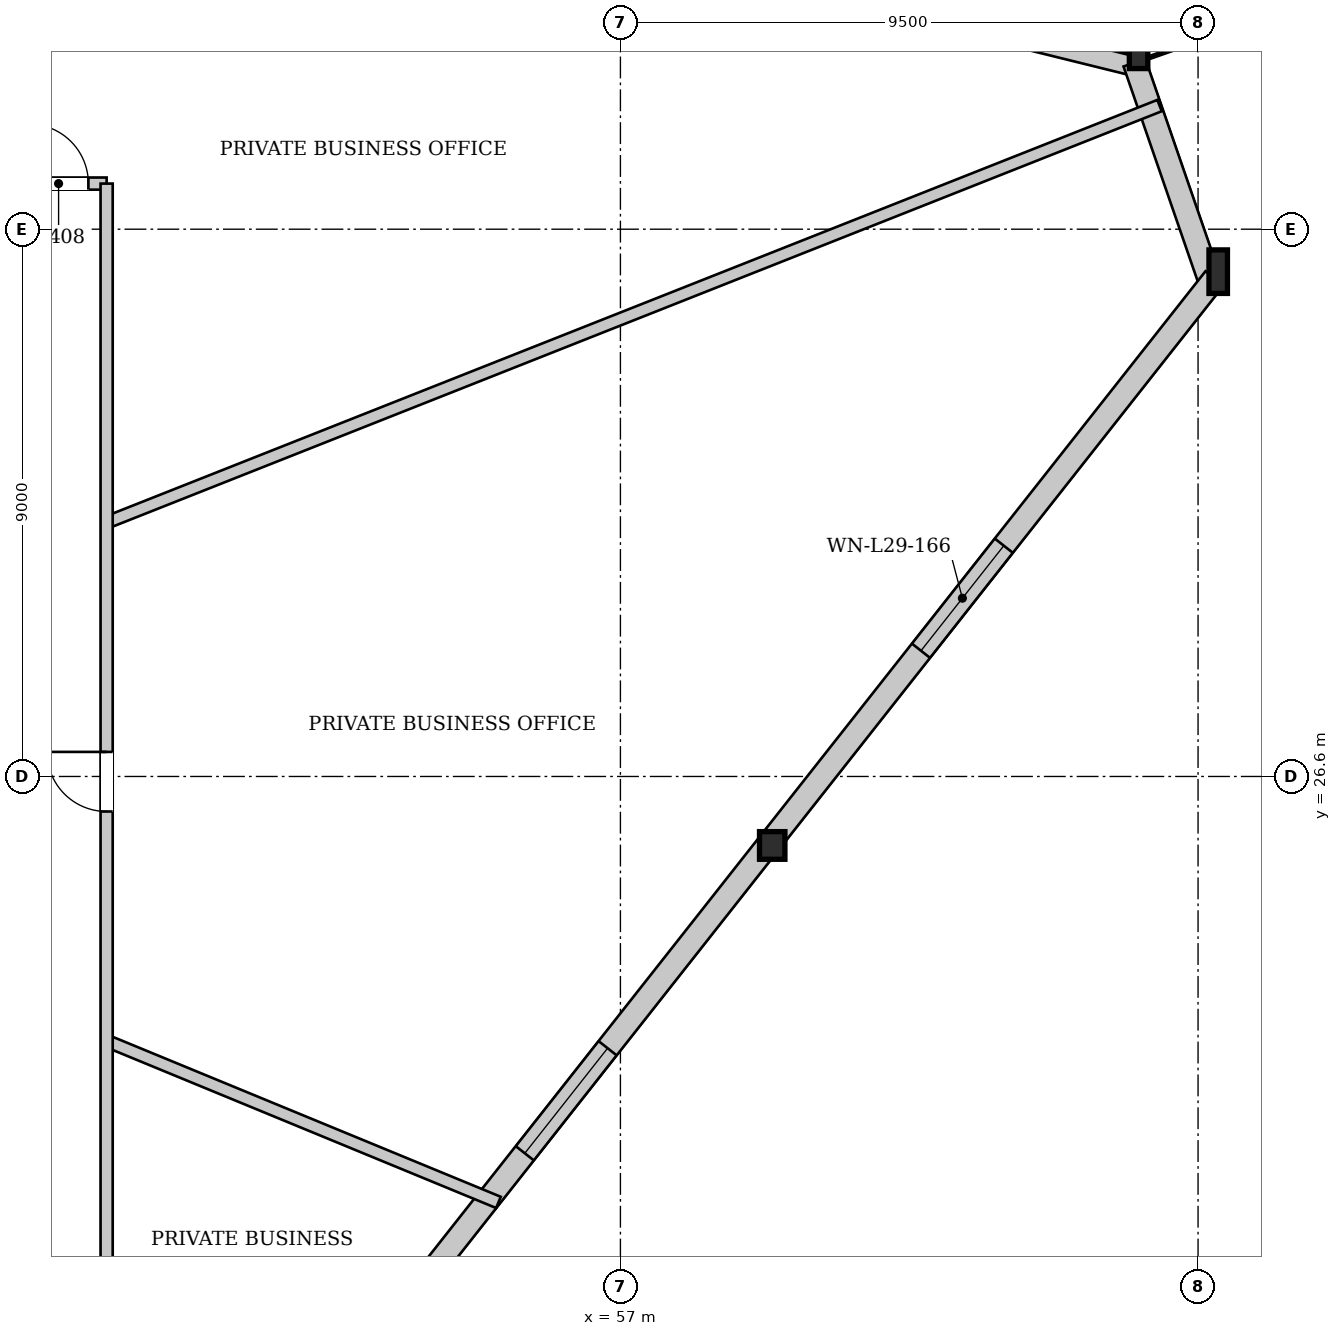
"""IFC4 building model, lengths in metres.
Left out: names, types, materials, properties, quantities, classifications, styles, units other than length and angle.
Written with IfcOpenShell. Run it as: python <this file> out.ifc"""

import sys

from ifc_helpers import new_model, si_unit, direction, frame, frame_2d, origin, origin_2d, place, context, subcontext, project, spatial, rectangle, i_section, extrude, source, transform, mapped, element, fill, save


model = new_model("IFC4")
c1 = context("Model", 3, precision=1e-05, world=origin(), true_north=direction((0.0, 1.0)))
c2 = subcontext(c1, "Body", "Model", "MODEL_VIEW")
j1 = project(units=[si_unit("LENGTHUNIT", "METRE"), si_unit("PLANEANGLEUNIT", "RADIAN")], contexts=[c1])
p1 = place(None, origin())
s1 = spatial("IfcSite", under=j1, at=p1, CompositionType="ELEMENT")
p2 = place(p1, origin())
s2 = spatial("IfcBuilding", under=s1, at=p2, CompositionType="ELEMENT")
p3 = place(p2, frame((0.0, 0.0, 112.8)))
s3 = spatial("IfcBuildingStorey", under=s2, at=p3, CompositionType="ELEMENT", Elevation=112.8)
m1 = source(origin(), c2, "Body", "SweptSolid", [
    extrude(i_section(OverallWidth=0.304, OverallDepth=0.716, WebThickness=0.021, FlangeThickness=0.04, at=origin_2d()), origin(), (0.0, 0.0, 1.0), 3.42),
])
p4 = place(p3, frame((66.92, 34.674, 0.0), z_axis=(-0.052108729922, 0.133269861321, 0.989708959406), x_axis=(-0.931338427179, -0.364154821553, 0.0)))
e1 = element("IfcColumn", 1, at=p4, inside=s3, PredefinedType="COLUMN", context=c2, shape_type="MappedRepresentation", body=[
    mapped(m1, transform((0.0, 0.0, 0.0), x_axis=(1.0, 0.0, 0.0), y_axis=(0.0, 1.0, 0.0), z_axis=(0.0, 0.0, 1.0), scale=1.0)),
])
m2 = source(origin(), c2, "Body", "SweptSolid", [
    extrude(i_section(OverallWidth=0.304, OverallDepth=0.716, WebThickness=0.021, FlangeThickness=0.04, at=origin_2d()), origin(), (0.0, 0.0, 1.0), 3.416),
])
p5 = place(p3, frame((65.634, 38.4, 0.0), z_axis=(-0.065470800854, 0.116789616371, 0.990996346988), x_axis=(-0.872287452748, -0.488993455763, 0.0)))
e2 = element("IfcColumn", 2, at=p5, inside=s3, PredefinedType="COLUMN", context=c2, shape_type="MappedRepresentation", body=[
    mapped(m2, transform((0.0, 0.0, 0.0), x_axis=(1.0, 0.0, 0.0), y_axis=(0.0, 1.0, 0.0), z_axis=(0.0, 0.0, 1.0), scale=1.0)),
])
m3 = source(origin(), c2, "Body", "SweptSolid", [
    extrude(i_section(OverallWidth=0.418, OverallDepth=0.455, WebThickness=0.038, FlangeThickness=0.059, at=origin_2d()), origin(), (0.0, 0.0, 1.0), 3.405),
])
p6 = place(p3, frame((59.516, 25.282, 0.0), z_axis=(-0.011256550997, 0.107976852234, 0.994089678772), x_axis=(-0.994609898476, -0.1036877517, 0.0)))
e3 = element("IfcColumn", 3, at=p6, inside=s3, PredefinedType="COLUMN", context=c2, shape_type="MappedRepresentation", body=[
    mapped(m3, transform((0.0, 0.0, 0.0), x_axis=(1.0, 0.0, 0.0), y_axis=(0.0, 1.0, 0.0), z_axis=(0.0, 0.0, 1.0), scale=1.0)),
])
p7 = place(p3, frame((42.954, 43.838, 0.0), z_axis=(0.0, 0.0, 1.0), x_axis=(0.970815465414, -0.239827713396, 0.0)))
e4 = element("IfcWall", 4, at=p7, inside=s3, PredefinedType="SOLIDWALL", context=c2, shape_type="SweptSolid", body=[
    extrude(rectangle(XDim=23.322, YDim=0.32, at=frame_2d((11.661, 0.0))), origin(), (0.0, 0.0, 1.0), 2.692),
])
p8 = place(p7, frame((6.913, 0.0, 0.0)))
e5 = element("IfcOpeningElement", 5, at=p8, cuts=e4, PredefinedType="OPENING", context=c2, shape_type="SweptSolid", body=[
    extrude(rectangle(XDim=1.1, YDim=2.3, at=frame_2d((0.55, 1.15))), frame((0.0, 0.17, 0.0), z_axis=(0.0, -1.0, 0.0), x_axis=(1.0, 0.0, 0.0)), (0.0, 0.0, 1.0), 0.34),
])
p9 = place(p7, frame((16.358, 0.0, 0.372)))
e6 = element("IfcOpeningElement", 6, at=p9, cuts=e4, PredefinedType="OPENING", context=c2, shape_type="SweptSolid", body=[
    extrude(rectangle(XDim=1.8, YDim=2.2, at=frame_2d((0.9, 1.1))), frame((0.0, 0.17, 0.0), z_axis=(0.0, -1.0, 0.0), x_axis=(1.0, 0.0, 0.0)), (0.0, 0.0, 1.0), 0.34),
])
p10 = place(p3, frame((65.454, 38.338, 0.0), z_axis=(0.0, 0.0, 1.0), x_axis=(0.32644681429, -0.945215571941, 0.0)))
e7 = element("IfcWall", 7, at=p10, inside=s3, PredefinedType="SOLIDWALL", context=c2, shape_type="SweptSolid", body=[
    extrude(rectangle(XDim=3.942, YDim=0.38, at=frame_2d((1.971, 0.0))), origin(), (0.0, 0.0, 1.0), 2.692),
])
p11 = place(p3, frame((66.771, 34.791, 0.0), z_axis=(0.0, 0.0, 1.0), x_axis=(-0.619144125254, -0.785277372757, 0.0)))
e8 = element("IfcWall", 8, at=p11, inside=s3, PredefinedType="SOLIDWALL", context=c2, shape_type="SweptSolid", body=[
    extrude(rectangle(XDim=23.92, YDim=0.38, at=frame_2d((11.96, 0.0))), origin(), (0.0, 0.0, 1.0), 2.692),
])
p12 = place(p11, frame((5.598, 0.0, 0.322)))
e9 = element("IfcOpeningElement", 9, at=p12, cuts=e8, PredefinedType="OPENING", context=c2, shape_type="SweptSolid", body=[
    extrude(rectangle(XDim=2.2, YDim=2.25, at=frame_2d((1.1, 1.125))), frame((0.0, 0.2, 0.0), z_axis=(0.0, -1.0, 0.0), x_axis=(1.0, 0.0, 0.0)), (0.0, 0.0, 1.0), 0.4),
])
p13 = place(p11, frame((16.122, 0.0, 0.322)))
e10 = element("IfcOpeningElement", 10, at=p13, cuts=e8, PredefinedType="OPENING", context=c2, shape_type="SweptSolid", body=[
    extrude(rectangle(XDim=2.2, YDim=2.25, at=frame_2d((1.1, 1.125))), frame((0.0, 0.2, 0.0), z_axis=(0.0, -1.0, 0.0), x_axis=(1.0, 0.0, 0.0)), (0.0, 0.0, 1.0), 0.4),
])
p14 = place(p3, frame((48.55, 22.252, 0.0), z_axis=(0.0, 0.0, 1.0), x_axis=(0.924536579634, -0.381093312613, 0.0)))
e11 = element("IfcWall", 11, at=p14, inside=s3, PredefinedType="PARTITIONING", context=c2, shape_type="SweptSolid", body=[
    extrude(rectangle(XDim=6.97, YDim=0.2, at=frame_2d((3.485, 0.0))), origin(), (0.0, 0.0, 1.0), 3.3),
])
p15 = place(p3, frame((48.55, 30.777, 0.0), z_axis=(0.0, 0.0, 1.0), x_axis=(0.929775488652, 0.368127071407, 0.0)))
e12 = element("IfcWall", 12, at=p15, inside=s3, PredefinedType="PARTITIONING", context=c2, shape_type="SweptSolid", body=[
    extrude(rectangle(XDim=18.625, YDim=0.2, at=frame_2d((9.312, 0.0))), origin(), (0.0, 0.0, 1.0), 3.3),
])
p16 = place(p3, frame((27.45, 36.35, 0.0), z_axis=(0.0, 0.0, 1.0), x_axis=(1.0, 0.0, 0.0)))
e13 = element("IfcWall", 13, at=p16, inside=s3, PredefinedType="PARTITIONING", context=c2, shape_type="SweptSolid", body=[
    extrude(rectangle(XDim=21.1, YDim=0.2, at=frame_2d((10.55, 0.0))), origin(), (0.0, 0.0, 1.0), 3.3),
])
p17 = place(p16, frame((19.82, 0.0, 0.0)))
e14 = element("IfcOpeningElement", 14, at=p17, cuts=e13, PredefinedType="OPENING", context=c2, shape_type="SweptSolid", body=[
    extrude(rectangle(XDim=0.98, YDim=2.15, at=frame_2d((0.49, 1.075))), frame((0.0, 0.11, 0.0), z_axis=(0.0, -1.0, 0.0), x_axis=(1.0, 0.0, 0.0)), (0.0, 0.0, 1.0), 0.22),
])
p18 = place(p16, frame((10.695, 0.0, 0.0)))
e15 = element("IfcOpeningElement", 15, at=p18, cuts=e13, PredefinedType="OPENING", context=c2, shape_type="SweptSolid", body=[
    extrude(rectangle(XDim=0.98, YDim=2.15, at=frame_2d((0.49, 1.075))), frame((0.0, 0.11, 0.0), z_axis=(0.0, -1.0, 0.0), x_axis=(1.0, 0.0, 0.0)), (0.0, 0.0, 1.0), 0.22),
])
p19 = place(p3, frame((48.55, 16.85, 0.0), z_axis=(0.0, 0.0, 1.0), x_axis=(0.0, 1.0, 0.0)))
e16 = element("IfcWall", 16, at=p19, inside=s3, PredefinedType="PARTITIONING", context=c2, shape_type="SweptSolid", body=[
    extrude(rectangle(XDim=19.5, YDim=0.2, at=frame_2d((9.75, 0.0))), origin(), (0.0, 0.0, 1.0), 3.3),
])
p20 = place(p19, frame((9.174, 0.0, 0.0)))
e17 = element("IfcOpeningElement", 17, at=p20, cuts=e16, PredefinedType="OPENING", context=c2, shape_type="SweptSolid", body=[
    extrude(rectangle(XDim=0.98, YDim=2.15, at=frame_2d((0.49, 1.075))), frame((0.0, 0.11, 0.0), z_axis=(0.0, -1.0, 0.0), x_axis=(1.0, 0.0, 0.0)), (0.0, 0.0, 1.0), 0.22),
])
m4 = source(origin(), c2, "Body", "SweptSolid", [
    extrude(rectangle(XDim=2.2, YDim=2.25, at=frame_2d((1.1, 1.125))), frame((0.0, 0.03, 0.0), z_axis=(0.0, -1.0, 0.0), x_axis=(1.0, 0.0, 0.0)), (0.0, 0.0, 1.0), 0.06),
])
p21 = place(p12, origin())
e18 = element("IfcWindow", 18, at=p21, inside=s3, PartitioningType="SINGLE_PANEL", PredefinedType="WINDOW", context=c2, shape_type="MappedRepresentation", body=[
    mapped(m4, transform((0.0, 0.0, 0.0), x_axis=(1.0, 0.0, 0.0), y_axis=(0.0, 1.0, 0.0), z_axis=(0.0, 0.0, 1.0), scale=1.0)),
])
fill(e9, e18)
p22 = place(p13, origin())
e19 = element("IfcWindow", 19, at=p22, inside=s3, PartitioningType="SINGLE_PANEL", PredefinedType="WINDOW", context=c2, shape_type="MappedRepresentation", body=[
    mapped(m4, transform((0.0, 0.0, 0.0), x_axis=(1.0, 0.0, 0.0), y_axis=(0.0, 1.0, 0.0), z_axis=(0.0, 0.0, 1.0), scale=1.0)),
])
fill(e10, e19)
m5 = source(origin(), c2, "Body", "SweptSolid", [
    extrude(rectangle(XDim=0.98, YDim=2.15, at=frame_2d((0.49, 1.075))), frame((0.0, 0.025, 0.0), z_axis=(0.0, -1.0, 0.0), x_axis=(1.0, 0.0, 0.0)), (0.0, 0.0, 1.0), 0.05),
])
p23 = place(p17, origin())
e20 = element("IfcDoor", 20, at=p23, inside=s3, OperationType="SINGLE_SWING_LEFT", PredefinedType="DOOR", context=c2, shape_type="MappedRepresentation", body=[
    mapped(m5, transform((0.0, 0.0, 0.0), x_axis=(1.0, 0.0, 0.0), y_axis=(0.0, 1.0, 0.0), z_axis=(0.0, 0.0, 1.0), scale=1.0)),
])
fill(e14, e20)
p24 = place(p20, origin())
e21 = element("IfcDoor", 21, at=p24, inside=s3, OperationType="SINGLE_SWING_RIGHT", PredefinedType="DOOR", context=c2, shape_type="MappedRepresentation", body=[
    mapped(m5, transform((0.0, 0.0, 0.0), x_axis=(1.0, 0.0, 0.0), y_axis=(0.0, 1.0, 0.0), z_axis=(0.0, 0.0, 1.0), scale=1.0)),
])
fill(e17, e21)
save(model, sys.argv[1])
